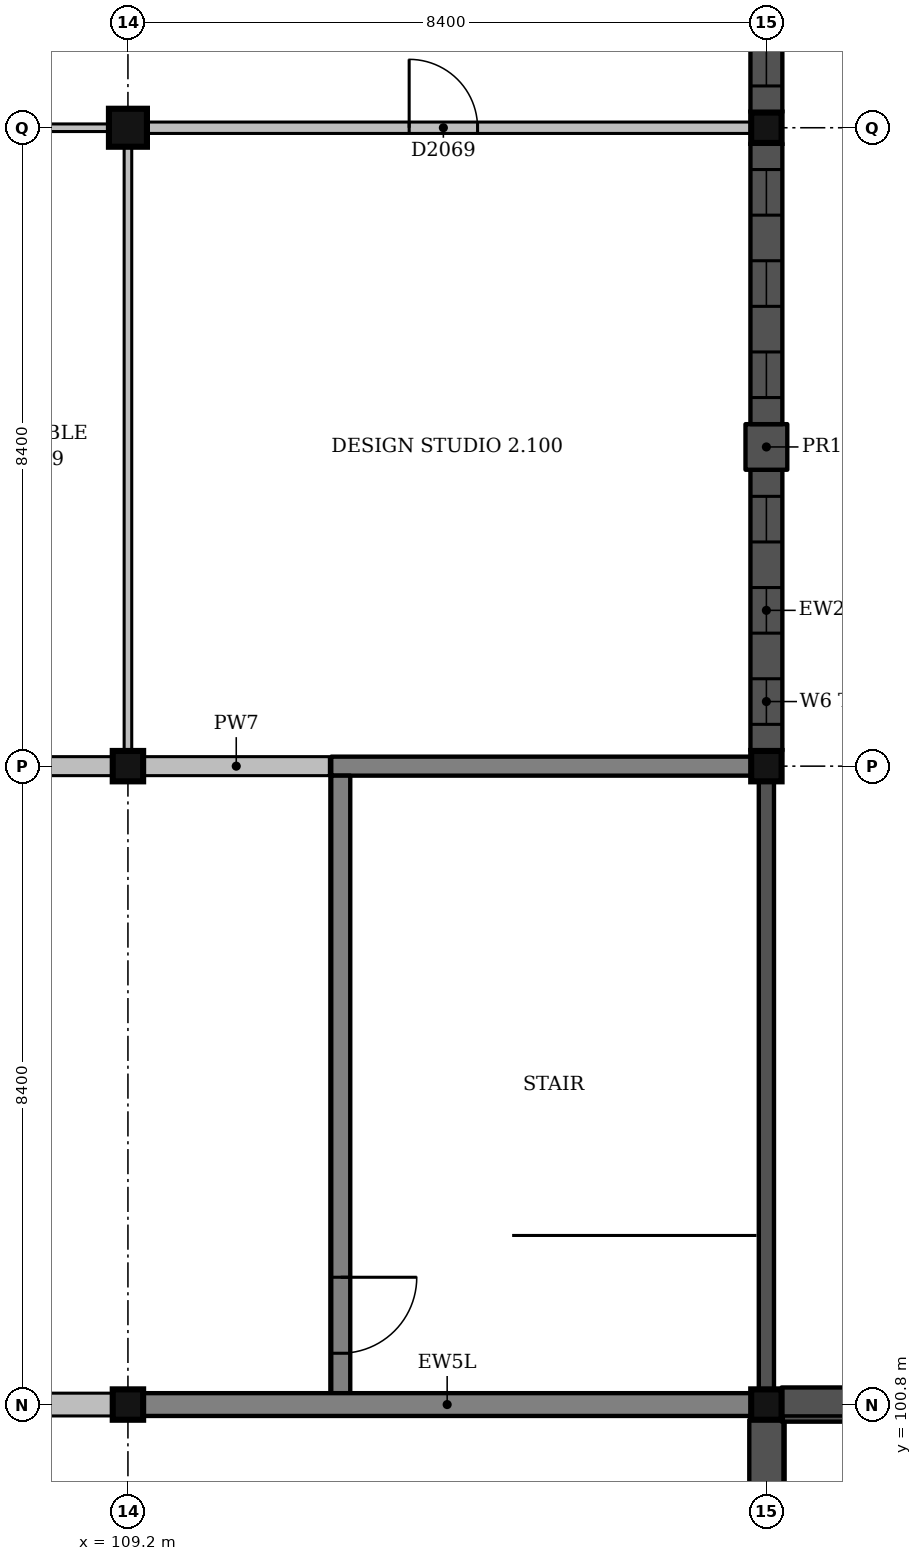
"""IFC4 building model, lengths in metres.
Left out: names, types, materials, properties, quantities, classifications, styles, units other than length and angle.
Written with IfcOpenShell. Run it as: python <this file> out.ifc"""

import sys

from ifc_helpers import new_model, si_unit, direction, frame, frame_2d, origin, origin_2d, place, context, subcontext, project, spatial, rectangle, extrude, element, fill, save


model = new_model("IFC4")
c1 = context("Model", 3, precision=1e-05, world=origin(), true_north=direction((0.0, 1.0)))
c2 = subcontext(c1, "Body", "Model", "MODEL_VIEW")
j1 = project(units=[si_unit("LENGTHUNIT", "METRE"), si_unit("PLANEANGLEUNIT", "RADIAN")], contexts=[c1])
p1 = place(None, origin())
s1 = spatial("IfcSite", under=j1, at=p1, CompositionType="ELEMENT")
p2 = place(p1, origin())
s2 = spatial("IfcBuilding", under=s1, at=p2, CompositionType="ELEMENT")
p3 = place(p2, frame((0.0, 0.0, 9.0)))
s3 = spatial("IfcBuildingStorey", under=s2, at=p3, CompositionType="ELEMENT", Elevation=9.0)
for number, where, z_axis, x_axis in (
    (1, (117.6, 100.8, 0.0), (0.0, 0.0, 1.0), (1.0, 0.0, 0.0)),
    (2, (109.2, 109.2, 0.0), (0.0, 0.0, 1.0), (1.0, 0.0, 0.0)),
):
    element("IfcColumn", number, at=place(p3, frame(where, z_axis=z_axis, x_axis=x_axis)), inside=s3, PredefinedType="COLUMN", context=c2, shape_type="SweptSolid", body=[
        extrude(rectangle(XDim=0.4, YDim=0.4, at=origin_2d()), origin(), (0.0, 0.0, 1.0), 4.5),
    ])
p4 = place(p3, frame((109.2, 117.6, -1.5), z_axis=(0.0, 0.0, 1.0), x_axis=(1.0, 0.0, 0.0)))
e3 = element("IfcColumn", 3, at=p4, inside=s3, PredefinedType="COLUMN", context=c2, shape_type="SweptSolid", body=[
    extrude(rectangle(XDim=0.5, YDim=0.5, at=origin_2d()), origin(), (0.0, 0.0, 1.0), 6.0),
])
p5 = place(p3, frame((117.6, 109.2, 0.0), z_axis=(0.0, 0.0, 1.0), x_axis=(1.0, 0.0, 0.0)))
e4 = element("IfcColumn", 4, at=p5, inside=s3, PredefinedType="COLUMN", context=c2, shape_type="SweptSolid", body=[
    extrude(rectangle(XDim=0.4, YDim=0.4, at=origin_2d()), origin(), (0.0, 0.0, 1.0), 4.5),
])
p6 = place(p3, frame((117.6, 117.6, -1.5), z_axis=(0.0, 0.0, 1.0), x_axis=(1.0, 0.0, 0.0)))
e5 = element("IfcColumn", 5, at=p6, inside=s3, PredefinedType="COLUMN", context=c2, shape_type="SweptSolid", body=[
    extrude(rectangle(XDim=0.4, YDim=0.4, at=origin_2d()), origin(), (0.0, 0.0, 1.0), 6.0),
])
p7 = place(p3, frame((109.2, 100.8, 0.0), z_axis=(0.0, 0.0, 1.0), x_axis=(1.0, 0.0, 0.0)))
e6 = element("IfcColumn", 6, at=p7, inside=s3, PredefinedType="COLUMN", context=c2, shape_type="SweptSolid", body=[
    extrude(rectangle(XDim=0.4, YDim=0.4, at=origin_2d()), origin(), (0.0, 0.0, 1.0), 4.5),
])
p8 = place(p3, frame((111.875, 109.2, 0.0), z_axis=(0.0, 0.0, 1.0), x_axis=(1.0, 0.0, 0.0)))
e7 = element("IfcWall", 7, at=p8, inside=s3, PredefinedType="SHEAR", context=c2, shape_type="SweptSolid", body=[
    extrude(rectangle(XDim=5.525, YDim=0.25, at=frame_2d((2.762, 0.0))), origin(), (0.0, 0.0, 1.0), 4.5),
])
p9 = place(p3, frame((112.0, 100.925, 0.0), z_axis=(0.0, 0.0, 1.0), x_axis=(0.0, 1.0, 0.0)))
e8 = element("IfcWall", 8, at=p9, inside=s3, PredefinedType="SHEAR", context=c2, shape_type="SweptSolid", body=[
    extrude(rectangle(XDim=8.15, YDim=0.25, at=frame_2d((4.075, 0.0))), origin(), (0.0, 0.0, 1.0), 4.5),
])
p10 = place(p9, frame((0.55, 0.0, 0.0)))
e9 = element("IfcOpeningElement", 9, at=p10, cuts=e8, PredefinedType="OPENING", context=c2, shape_type="SweptSolid", body=[
    extrude(rectangle(XDim=1.0, YDim=2.1, at=frame_2d((0.5, 1.05))), frame((0.0, 0.135, 0.0), z_axis=(0.0, -1.0, 0.0), x_axis=(1.0, 0.0, 0.0)), (0.0, 0.0, 1.0), 0.27),
])
p11 = place(p3, frame((117.6, 100.6, 0.0), z_axis=(0.0, 0.0, 1.0), x_axis=(0.0, -1.0, 0.0)))
e10 = element("IfcWall", 10, at=p11, inside=s3, PredefinedType="SOLIDWALL", context=c2, shape_type="SweptSolid", body=[
    extrude(rectangle(XDim=3.94, YDim=0.45, at=frame_2d((1.97, 0.0))), origin(), (0.0, 0.0, 1.0), 3.65),
])
p12 = place(p3, frame((121.74, 100.8, 0.0), z_axis=(0.0, 0.0, 1.0), x_axis=(-1.0, 0.0, 0.0)))
e11 = element("IfcWall", 11, at=p12, inside=s3, PredefinedType="SOLIDWALL", context=c2, shape_type="SweptSolid", body=[
    extrude(rectangle(XDim=3.94, YDim=0.45, at=frame_2d((1.97, 0.0))), origin(), (0.0, 0.0, 1.0), 3.35),
])
p13 = place(p3, frame((117.6, 109.4, 0.0), z_axis=(0.0, 0.0, 1.0), x_axis=(0.0, 1.0, 0.0)))
e12 = element("IfcWall", 12, at=p13, inside=s3, PredefinedType="SOLIDWALL", context=c2, shape_type="SweptSolid", body=[
    extrude(rectangle(XDim=3.7, YDim=0.42, at=frame_2d((1.85, 0.0))), origin(), (0.0, 0.0, 1.0), 4.2),
])
p14 = place(p13, frame((0.35, 0.0, 1.0)))
e13 = element("IfcOpeningElement", 13, at=p14, cuts=e12, PredefinedType="OPENING", context=c2, shape_type="SweptSolid", body=[
    extrude(rectangle(XDim=0.6, YDim=2.1, at=frame_2d((0.3, 1.05))), frame((0.0, 0.22, 0.0), z_axis=(0.0, -1.0, 0.0), x_axis=(1.0, 0.0, 0.0)), (0.0, 0.0, 1.0), 0.44),
])
p15 = place(p13, frame((1.55, 0.0, 1.0)))
e14 = element("IfcOpeningElement", 14, at=p15, cuts=e12, PredefinedType="OPENING", context=c2, shape_type="SweptSolid", body=[
    extrude(rectangle(XDim=0.6, YDim=2.1, at=frame_2d((0.3, 1.05))), frame((0.0, 0.22, 0.0), z_axis=(0.0, -1.0, 0.0), x_axis=(1.0, 0.0, 0.0)), (0.0, 0.0, 1.0), 0.44),
])
p16 = place(p13, frame((2.75, 0.0, 1.0)))
e15 = element("IfcOpeningElement", 15, at=p16, cuts=e12, PredefinedType="OPENING", context=c2, shape_type="SweptSolid", body=[
    extrude(rectangle(XDim=0.6, YDim=2.1, at=frame_2d((0.3, 1.05))), frame((0.0, 0.22, 0.0), z_axis=(0.0, -1.0, 0.0), x_axis=(1.0, 0.0, 0.0)), (0.0, 0.0, 1.0), 0.44),
])
p17 = place(p3, frame((117.6, 113.1, 0.0), z_axis=(0.0, 0.0, 1.0), x_axis=(0.0, 1.0, 0.0)))
e16 = element("IfcWall", 16, at=p17, inside=s3, PredefinedType="SOLIDWALL", context=c2, shape_type="SweptSolid", body=[
    extrude(rectangle(XDim=0.6, YDim=0.55, at=frame_2d((0.3, 0.0))), origin(), (0.0, 0.0, 1.0), 4.2),
])
p18 = place(p3, frame((117.6, 113.7, 0.0), z_axis=(0.0, 0.0, 1.0), x_axis=(0.0, 1.0, 0.0)))
e17 = element("IfcWall", 17, at=p18, inside=s3, PredefinedType="SOLIDWALL", context=c2, shape_type="SweptSolid", body=[
    extrude(rectangle(XDim=3.7, YDim=0.42, at=frame_2d((1.85, 0.0))), origin(), (0.0, 0.0, 1.0), 4.2),
])
p19 = place(p18, frame((0.35, 0.0, 1.0)))
e18 = element("IfcOpeningElement", 18, at=p19, cuts=e17, PredefinedType="OPENING", context=c2, shape_type="SweptSolid", body=[
    extrude(rectangle(XDim=0.6, YDim=2.1, at=frame_2d((0.3, 1.05))), frame((0.0, 0.22, 0.0), z_axis=(0.0, -1.0, 0.0), x_axis=(1.0, 0.0, 0.0)), (0.0, 0.0, 1.0), 0.44),
])
p20 = place(p18, frame((1.55, 0.0, 1.0)))
e19 = element("IfcOpeningElement", 19, at=p20, cuts=e17, PredefinedType="OPENING", context=c2, shape_type="SweptSolid", body=[
    extrude(rectangle(XDim=0.6, YDim=2.1, at=frame_2d((0.3, 1.05))), frame((0.0, 0.22, 0.0), z_axis=(0.0, -1.0, 0.0), x_axis=(1.0, 0.0, 0.0)), (0.0, 0.0, 1.0), 0.44),
])
p21 = place(p18, frame((2.75, 0.0, 1.0)))
e20 = element("IfcOpeningElement", 20, at=p21, cuts=e17, PredefinedType="OPENING", context=c2, shape_type="SweptSolid", body=[
    extrude(rectangle(XDim=0.6, YDim=2.1, at=frame_2d((0.3, 1.05))), frame((0.0, 0.22, 0.0), z_axis=(0.0, -1.0, 0.0), x_axis=(1.0, 0.0, 0.0)), (0.0, 0.0, 1.0), 0.44),
])
p22 = place(p3, frame((117.6, 117.8, 0.0), z_axis=(0.0, 0.0, 1.0), x_axis=(0.0, 1.0, 0.0)))
e21 = element("IfcWall", 21, at=p22, inside=s3, PredefinedType="SOLIDWALL", context=c2, shape_type="SweptSolid", body=[
    extrude(rectangle(XDim=3.7, YDim=0.42, at=frame_2d((1.85, 0.0))), origin(), (0.0, 0.0, 1.0), 3.45),
])
p23 = place(p22, frame((0.35, 0.0, 1.0)))
e22 = element("IfcOpeningElement", 22, at=p23, cuts=e21, PredefinedType="OPENING", context=c2, shape_type="SweptSolid", body=[
    extrude(rectangle(XDim=0.6, YDim=2.1, at=frame_2d((0.3, 1.05))), frame((0.0, 0.22, 0.0), z_axis=(0.0, -1.0, 0.0), x_axis=(1.0, 0.0, 0.0)), (0.0, 0.0, 1.0), 0.44),
])
p24 = place(p22, frame((1.55, 0.0, 1.0)))
e23 = element("IfcOpeningElement", 23, at=p24, cuts=e21, PredefinedType="OPENING", context=c2, shape_type="SweptSolid", body=[
    extrude(rectangle(XDim=0.6, YDim=2.1, at=frame_2d((0.3, 1.05))), frame((0.0, 0.22, 0.0), z_axis=(0.0, -1.0, 0.0), x_axis=(1.0, 0.0, 0.0)), (0.0, 0.0, 1.0), 0.44),
])
p25 = place(p22, frame((2.75, 0.0, 1.0)))
e24 = element("IfcOpeningElement", 24, at=p25, cuts=e21, PredefinedType="OPENING", context=c2, shape_type="SweptSolid", body=[
    extrude(rectangle(XDim=0.6, YDim=2.1, at=frame_2d((0.3, 1.05))), frame((0.0, 0.22, 0.0), z_axis=(0.0, -1.0, 0.0), x_axis=(1.0, 0.0, 0.0)), (0.0, 0.0, 1.0), 0.44),
])
p26 = place(p3, frame((117.6, 101.0, 0.0), z_axis=(0.0, 0.0, 1.0), x_axis=(0.0, 1.0, 0.0)))
e25 = element("IfcWall", 25, at=p26, inside=s3, PredefinedType="SOLIDWALL", context=c2, shape_type="SweptSolid", body=[
    extrude(rectangle(XDim=8.0, YDim=0.2, at=frame_2d((4.0, 0.0))), origin(), (0.0, 0.0, 1.0), 4.5),
])
for number, where, z_axis, x_axis in (
    (26, (101.0, 100.8, 0.0), (0.0, 0.0, 1.0), (1.0, 0.0, 0.0)),
    (27, (109.4, 100.8, 0.0), (0.0, 0.0, 1.0), (1.0, 0.0, 0.0)),
):
    element("IfcWall", number, at=place(p3, frame(where, z_axis=z_axis, x_axis=x_axis)), inside=s3, PredefinedType="SOLIDWALL", context=c2, shape_type="SweptSolid", body=[
        extrude(rectangle(XDim=8.0, YDim=0.3, at=frame_2d((4.0, 0.0))), origin(), (0.0, 0.0, 1.0), 4.5),
    ])
p27 = place(p3, frame((101.0, 109.2, 0.0), z_axis=(0.0, 0.0, 1.0), x_axis=(1.0, 0.0, 0.0)))
e28 = element("IfcWall", 28, at=p27, inside=s3, PredefinedType="SOLIDWALL", context=c2, shape_type="SweptSolid", body=[
    extrude(rectangle(XDim=8.0, YDim=0.25, at=frame_2d((4.0, 0.0))), origin(), (0.0, 0.0, 1.0), 3.45),
])
p28 = place(p3, frame((109.4, 109.2, 0.0), z_axis=(0.0, 0.0, 1.0), x_axis=(1.0, 0.0, 0.0)))
e29 = element("IfcWall", 29, at=p28, inside=s3, PredefinedType="SOLIDWALL", context=c2, shape_type="SweptSolid", body=[
    extrude(rectangle(XDim=2.45, YDim=0.25, at=frame_2d((1.225, 0.0))), origin(), (0.0, 0.0, 1.0), 3.45),
])
p29 = place(p3, frame((109.45, 117.6, 0.0), z_axis=(0.0, 0.0, 1.0), x_axis=(1.0, 0.0, 0.0)))
e30 = element("IfcWall", 30, at=p29, inside=s3, PredefinedType="PARTITIONING", context=c2, shape_type="SweptSolid", body=[
    extrude(rectangle(XDim=7.95, YDim=0.15, at=frame_2d((3.975, 0.0))), origin(), (0.0, 0.0, 1.0), 3.5),
])
p30 = place(p29, frame((3.45, 0.0, 0.0)))
e31 = element("IfcOpeningElement", 31, at=p30, cuts=e30, PredefinedType="OPENING", context=c2, shape_type="SweptSolid", body=[
    extrude(rectangle(XDim=0.9, YDim=2.1, at=frame_2d((0.45, 1.05))), frame((0.0, 0.085, 0.0), z_axis=(0.0, -1.0, 0.0), x_axis=(1.0, 0.0, 0.0)), (0.0, 0.0, 1.0), 0.17),
])
p31 = place(p3, frame((101.05, 117.6, 0.0), z_axis=(0.0, 0.0, 1.0), x_axis=(1.0, 0.0, 0.0)))
e32 = element("IfcWall", 32, at=p31, inside=s3, PredefinedType="PARTITIONING", context=c2, shape_type="SweptSolid", body=[
    extrude(rectangle(XDim=7.9, YDim=0.1, at=frame_2d((3.95, 0.0))), origin(), (0.0, 0.0, 1.0), 3.5),
])
p32 = place(p31, frame((2.85, 0.0, 0.0)))
e33 = element("IfcOpeningElement", 33, at=p32, cuts=e32, PredefinedType="OPENING", context=c2, shape_type="SweptSolid", body=[
    extrude(rectangle(XDim=0.9, YDim=2.1, at=frame_2d((0.45, 1.05))), frame((0.0, 0.06, 0.0), z_axis=(0.0, -1.0, 0.0), x_axis=(1.0, 0.0, 0.0)), (0.0, 0.0, 1.0), 0.12),
])
p33 = place(p31, frame((6.0, 0.0, 0.0)))
e34 = element("IfcOpeningElement", 34, at=p33, cuts=e32, PredefinedType="OPENING", context=c2, shape_type="SweptSolid", body=[
    extrude(rectangle(XDim=1.0, YDim=2.1, at=frame_2d((0.5, 1.05))), frame((0.0, 0.06, 0.0), z_axis=(0.0, -1.0, 0.0), x_axis=(1.0, 0.0, 0.0)), (0.0, 0.0, 1.0), 0.12),
])
p34 = place(p3, frame((109.2, 109.4, 0.0), z_axis=(0.0, 0.0, 1.0), x_axis=(0.0, 1.0, 0.0)))
e35 = element("IfcWall", 35, at=p34, inside=s3, PredefinedType="PARTITIONING", context=c2, shape_type="SweptSolid", body=[
    extrude(rectangle(XDim=7.95, YDim=0.1, at=frame_2d((3.975, 0.0))), origin(), (0.0, 0.0, 1.0), 4.15),
])
p35 = place(p14, origin())
e36 = element("IfcWindow", 36, at=p35, inside=s3, PartitioningType="SINGLE_PANEL", PredefinedType="WINDOW", context=c2, shape_type="SweptSolid", body=[
    extrude(rectangle(XDim=0.6, YDim=2.1, at=frame_2d((0.3, 1.05))), frame((0.0, 0.15, 0.0), z_axis=(0.0, -1.0, 0.0), x_axis=(1.0, 0.0, 0.0)), (0.0, 0.0, 1.0), 0.06),
])
fill(e13, e36)
p36 = place(p15, origin())
e37 = element("IfcWindow", 37, at=p36, inside=s3, PartitioningType="SINGLE_PANEL", PredefinedType="WINDOW", context=c2, shape_type="SweptSolid", body=[
    extrude(rectangle(XDim=0.6, YDim=2.1, at=frame_2d((0.3, 1.05))), frame((0.0, 0.15, 0.0), z_axis=(0.0, -1.0, 0.0), x_axis=(1.0, 0.0, 0.0)), (0.0, 0.0, 1.0), 0.06),
])
fill(e14, e37)
p37 = place(p16, origin())
e38 = element("IfcWindow", 38, at=p37, inside=s3, PartitioningType="SINGLE_PANEL", PredefinedType="WINDOW", context=c2, shape_type="SweptSolid", body=[
    extrude(rectangle(XDim=0.6, YDim=2.1, at=frame_2d((0.3, 1.05))), frame((0.0, 0.15, 0.0), z_axis=(0.0, -1.0, 0.0), x_axis=(1.0, 0.0, 0.0)), (0.0, 0.0, 1.0), 0.06),
])
fill(e15, e38)
p38 = place(p19, origin())
e39 = element("IfcWindow", 39, at=p38, inside=s3, PartitioningType="SINGLE_PANEL", PredefinedType="WINDOW", context=c2, shape_type="SweptSolid", body=[
    extrude(rectangle(XDim=0.6, YDim=2.1, at=frame_2d((0.3, 1.05))), frame((0.0, 0.15, 0.0), z_axis=(0.0, -1.0, 0.0), x_axis=(1.0, 0.0, 0.0)), (0.0, 0.0, 1.0), 0.06),
])
fill(e18, e39)
p39 = place(p20, origin())
e40 = element("IfcWindow", 40, at=p39, inside=s3, PartitioningType="SINGLE_PANEL", PredefinedType="WINDOW", context=c2, shape_type="SweptSolid", body=[
    extrude(rectangle(XDim=0.6, YDim=2.1, at=frame_2d((0.3, 1.05))), frame((0.0, 0.15, 0.0), z_axis=(0.0, -1.0, 0.0), x_axis=(1.0, 0.0, 0.0)), (0.0, 0.0, 1.0), 0.06),
])
fill(e19, e40)
p40 = place(p21, origin())
e41 = element("IfcWindow", 41, at=p40, inside=s3, PartitioningType="SINGLE_PANEL", PredefinedType="WINDOW", context=c2, shape_type="SweptSolid", body=[
    extrude(rectangle(XDim=0.6, YDim=2.1, at=frame_2d((0.3, 1.05))), frame((0.0, 0.15, 0.0), z_axis=(0.0, -1.0, 0.0), x_axis=(1.0, 0.0, 0.0)), (0.0, 0.0, 1.0), 0.06),
])
fill(e20, e41)
p41 = place(p23, origin())
e42 = element("IfcWindow", 42, at=p41, inside=s3, PartitioningType="SINGLE_PANEL", PredefinedType="WINDOW", context=c2, shape_type="SweptSolid", body=[
    extrude(rectangle(XDim=0.6, YDim=2.1, at=frame_2d((0.3, 1.05))), frame((0.0, 0.15, 0.0), z_axis=(0.0, -1.0, 0.0), x_axis=(1.0, 0.0, 0.0)), (0.0, 0.0, 1.0), 0.06),
])
fill(e22, e42)
p42 = place(p30, origin())
e43 = element("IfcDoor", 43, at=p42, inside=s3, OperationType="SINGLE_SWING_LEFT", PredefinedType="DOOR", context=c2, shape_type="SweptSolid", body=[
    extrude(rectangle(XDim=0.9, YDim=2.1, at=frame_2d((0.45, 1.05))), frame((0.0, 0.025, 0.0), z_axis=(0.0, -1.0, 0.0), x_axis=(1.0, 0.0, 0.0)), (0.0, 0.0, 1.0), 0.05),
])
fill(e31, e43)
p43 = place(p10, origin())
e44 = element("IfcDoor", 44, at=p43, inside=s3, OperationType="SINGLE_SWING_RIGHT", PredefinedType="DOOR", context=c2, shape_type="SweptSolid", body=[
    extrude(rectangle(XDim=1.0, YDim=2.1, at=frame_2d((0.5, 1.05))), frame((0.0, 0.025, 0.0), z_axis=(0.0, -1.0, 0.0), x_axis=(1.0, 0.0, 0.0)), (0.0, 0.0, 1.0), 0.05),
])
fill(e9, e44)
save(model, sys.argv[1])
